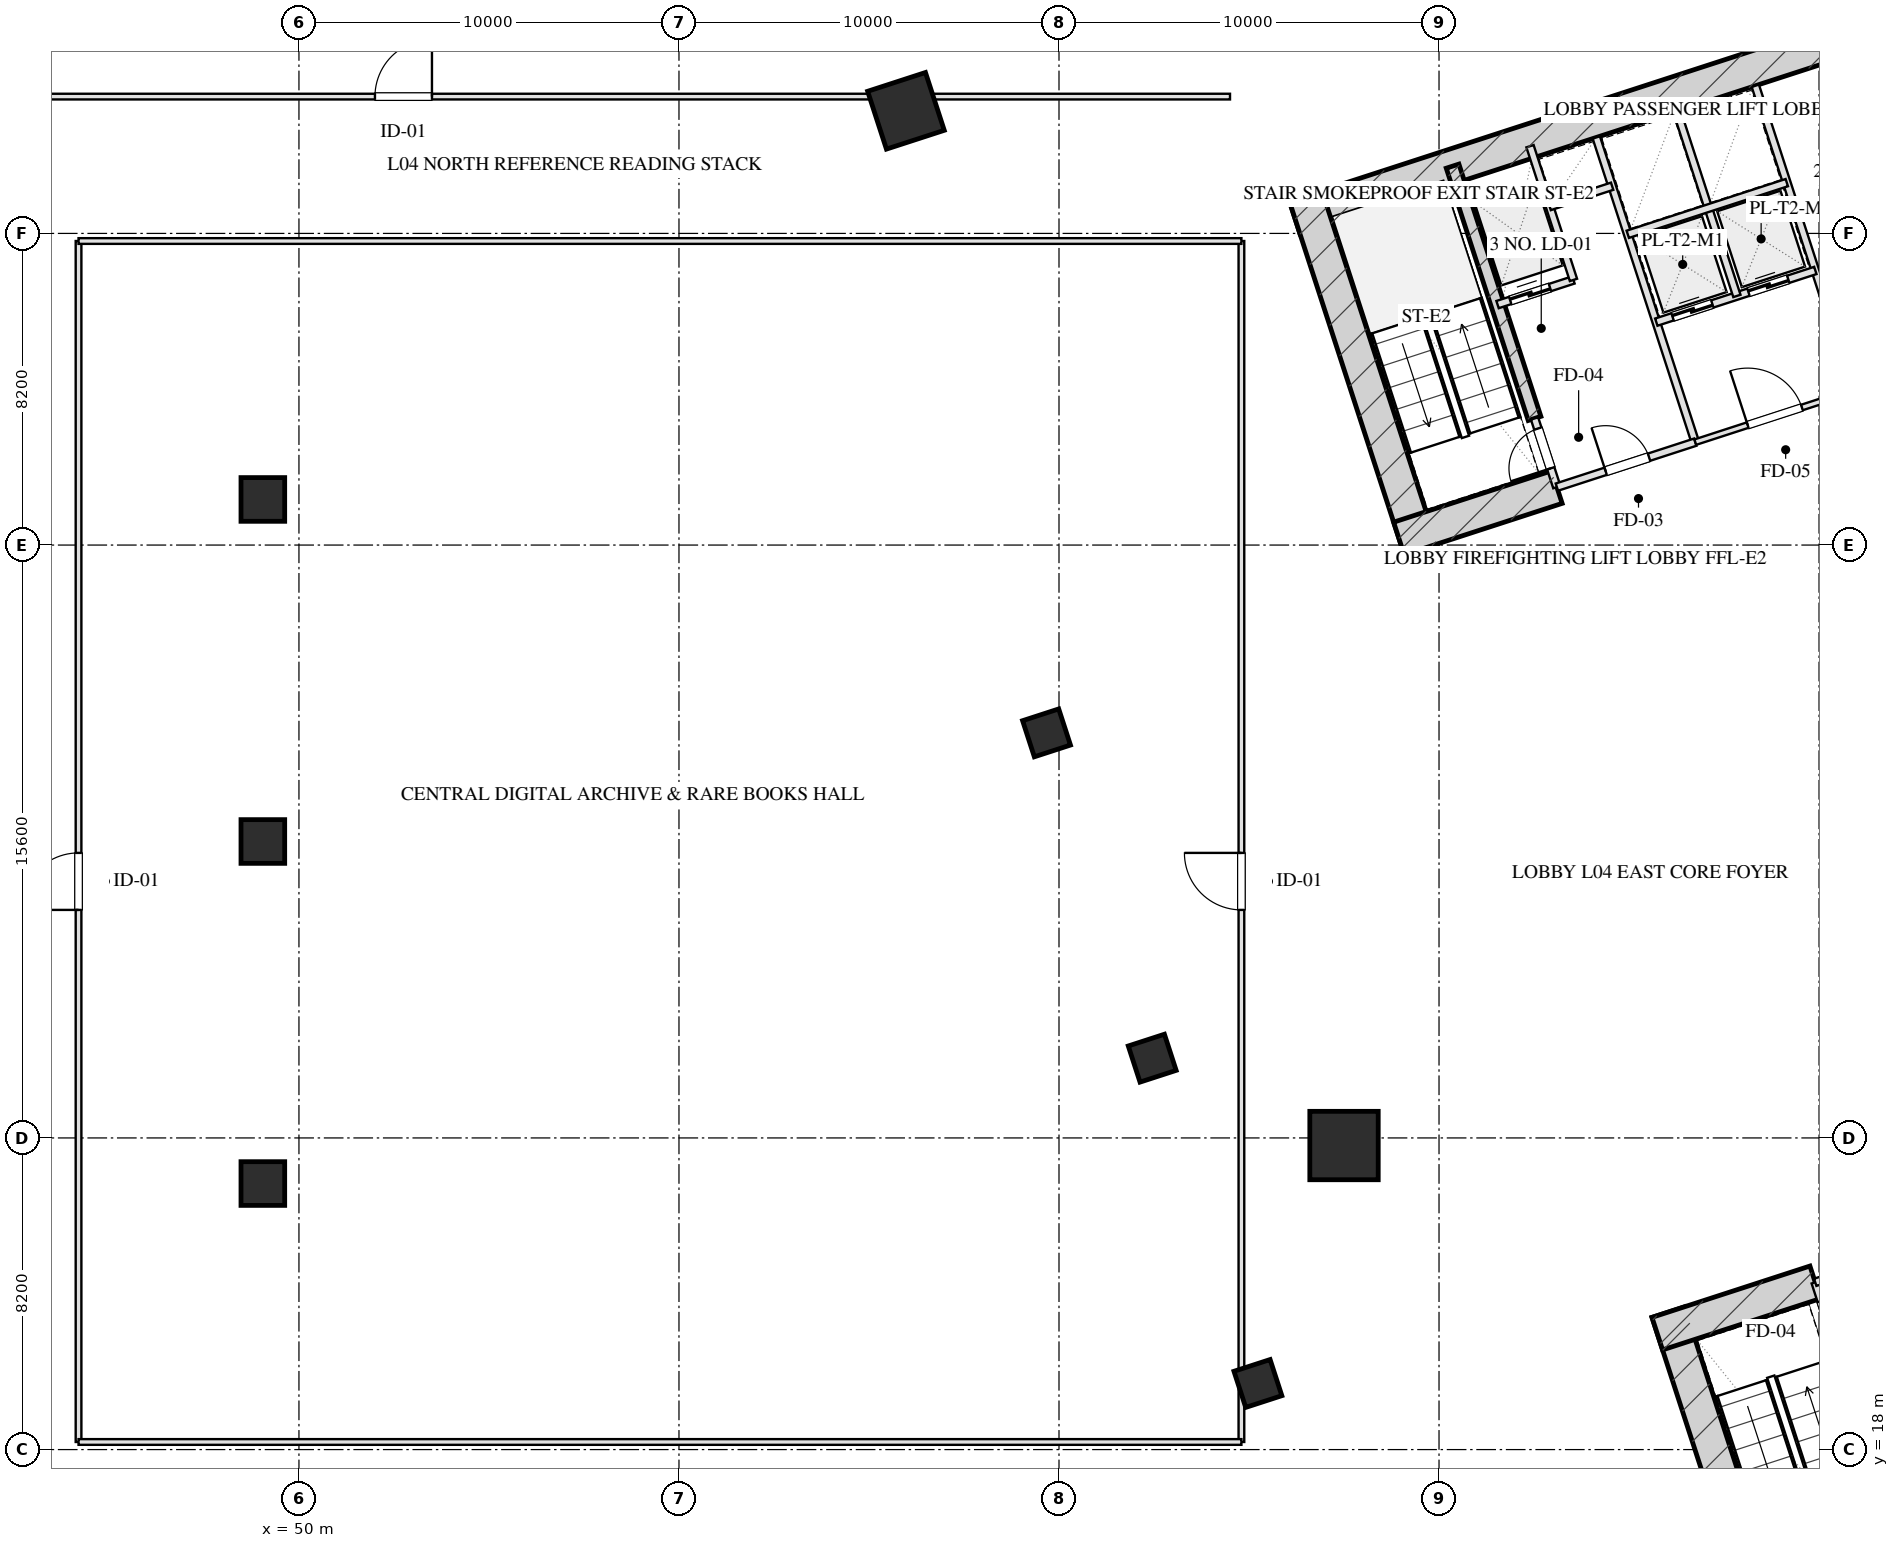
"""IFC4 building model, lengths in metres.
Left out: names, types, materials, properties, quantities, classifications, styles, units other than length and angle.
Written with IfcOpenShell. Run it as: python <this file> out.ifc"""

import sys

from ifc_helpers import new_model, si_unit, direction, frame, frame_2d, origin, origin_2d, place, context, subcontext, project, spatial, rectangle, hollow_rectangle, extrude, element, fill, save


model = new_model("IFC4")
c1 = context("Model", 3, precision=1e-05, world=origin(), true_north=direction((0.0, 1.0)))
c2 = subcontext(c1, "Body", "Model", "MODEL_VIEW")
j1 = project(units=[si_unit("LENGTHUNIT", "METRE"), si_unit("PLANEANGLEUNIT", "RADIAN")], contexts=[c1])
p1 = place(None, origin())
s1 = spatial("IfcSite", under=j1, at=p1, CompositionType="ELEMENT")
p2 = place(p1, origin())
s2 = spatial("IfcBuilding", under=s1, at=p2, CompositionType="ELEMENT")
p3 = place(p2, frame((0.0, 0.0, 22.0)))
s3 = spatial("IfcBuildingStorey", under=s2, at=p3, CompositionType="ELEMENT", Elevation=22.0)
p4 = place(p3, frame((88.487, 12.605, 0.0), z_axis=(0.0, 0.0, 1.0), x_axis=(0.951055016115, 0.309021611416, 0.0)))
e1 = element("IfcWall", 1, at=p4, inside=s3, PredefinedType="SHEAR", context=c2, shape_type="SweptSolid", body=[
    extrude(rectangle(XDim=16.7, YDim=0.9, at=frame_2d((8.35, 0.0))), origin(), (0.0, 0.0, 1.0), 4.0),
])
p5 = place(p3, frame((86.032, 21.618, 0.0), z_axis=(0.0, 0.0, 1.0), x_axis=(0.30901438634, -0.951057363693, 0.0)))
e2 = element("IfcWall", 2, at=p5, inside=s3, PredefinedType="SHEAR", context=c2, shape_type="SweptSolid", body=[
    extrude(rectangle(XDim=9.78, YDim=0.9, at=frame_2d((4.89, 0.0))), origin(), (0.0, 0.0, 1.0), 4.0),
])
p6 = place(p3, frame((85.743, 21.051, 0.0), z_axis=(0.0, 0.0, 1.0), x_axis=(0.951063623806, 0.308995118848, 0.0)))
e3 = element("IfcWall", 3, at=p6, inside=s3, PredefinedType="SHEAR", context=c2, shape_type="SweptSolid", body=[
    extrude(rectangle(XDim=4.37, YDim=0.9, at=frame_2d((2.185, 0.0))), origin(), (0.0, 0.0, 1.0), 4.0),
])
p7 = place(p3, frame((76.201, 50.419, 0.0), z_axis=(0.0, 0.0, 1.0), x_axis=(0.951056412142, 0.309017314926, 0.0)))
e4 = element("IfcWall", 4, at=p7, inside=s3, PredefinedType="SHEAR", context=c2, shape_type="SweptSolid", body=[
    extrude(rectangle(XDim=16.7, YDim=0.9, at=frame_2d((8.35, 0.0))), origin(), (0.0, 0.0, 1.0), 4.0),
])
p8 = place(p3, frame((79.512, 41.685, 0.0), z_axis=(0.0, 0.0, 1.0), x_axis=(-0.309021722829, 0.951054979914, 0.0)))
e5 = element("IfcWall", 5, at=p8, inside=s3, PredefinedType="SHEAR", context=c2, shape_type="SweptSolid", body=[
    extrude(rectangle(XDim=9.78, YDim=0.9, at=frame_2d((4.89, 0.0))), origin(), (0.0, 0.0, 1.0), 4.0),
])
p9 = place(p3, frame((82.514, 45.131, 0.0), z_axis=(0.0, 0.0, 1.0), x_axis=(-0.308988790936, 0.951065679686, 0.0)))
e6 = element("IfcWall", 6, at=p9, inside=s3, PredefinedType="SHEAR", context=c2, shape_type="SweptSolid", body=[
    extrude(rectangle(XDim=6.98, YDim=0.35, at=frame_2d((3.49, 0.0))), origin(), (0.0, 0.0, 1.0), 4.0),
])
p10 = place(p3, frame((78.945, 41.974, 0.0), z_axis=(0.0, 0.0, 1.0), x_axis=(0.951058289404, 0.309011537255, 0.0)))
e7 = element("IfcWall", 7, at=p10, inside=s3, PredefinedType="SHEAR", context=c2, shape_type="SweptSolid", body=[
    extrude(rectangle(XDim=4.37, YDim=0.9, at=frame_2d((2.185, 0.0))), origin(), (0.0, 0.0, 1.0), 4.0),
])
p11 = place(p3, frame((77.5, 26.0, 0.0), z_axis=(0.0, 0.0, 1.0), x_axis=(1.0, 0.0, 0.0)))
e8 = element("IfcColumn", 8, at=p11, inside=s3, PredefinedType="COLUMN", context=c2, shape_type="SweptSolid", body=[
    extrude(hollow_rectangle(XDim=1.8, YDim=1.8, WallThickness=0.06, at=origin_2d()), origin(), (0.0, 0.0, 1.0), 4.001),
])
for number, where, z_axis, x_axis in (
    (9, (49.05, 25.0, 0.0), (0.0, 0.0, 1.0), (1.0, 0.0, 0.0)),
    (10, (49.05, 34.0, 0.0), (0.0, 0.0, 1.0), (1.0, 0.0, 0.0)),
    (11, (49.05, 43.0, 0.0), (0.0, 0.0, 1.0), (1.0, 0.0, 0.0)),
):
    element("IfcColumn", number, at=place(p3, frame(where, z_axis=z_axis, x_axis=x_axis)), inside=s3, PredefinedType="COLUMN", context=c2, shape_type="SweptSolid", body=[
        extrude(hollow_rectangle(XDim=1.15, YDim=1.15, WallThickness=0.04, at=origin_2d()), origin(), (0.0, 0.0, 1.0), 4.001),
    ])
p12 = place(p3, frame((65.973, 53.226, 0.0), z_axis=(0.0, 0.0, 1.0), x_axis=(0.951056516295, 0.309016994375, 0.0)))
e12 = element("IfcColumn", 12, at=p12, inside=s3, PredefinedType="COLUMN", context=c2, shape_type="SweptSolid", body=[
    extrude(hollow_rectangle(XDim=1.6, YDim=1.6, WallThickness=0.055, at=origin_2d()), origin(), (0.0, 0.0, 1.0), 4.001),
])
for number, where, z_axis, x_axis in (
    (13, (75.234, 19.739, 0.0), (0.0, 0.0, 1.0), (0.951, 0.309, 0.0)),
    (14, (72.453, 28.299, 0.0), (0.0, 0.0, 1.0), (0.951, 0.309, 0.0)),
    (15, (69.672, 36.858, 0.0), (0.0, 0.0, 1.0), (0.951, 0.309, 0.0)),
):
    element("IfcColumn", number, at=place(p3, frame(where, z_axis=z_axis, x_axis=x_axis)), inside=s3, PredefinedType="COLUMN", context=c2, shape_type="SweptSolid", body=[
        extrude(hollow_rectangle(XDim=1.0, YDim=1.0, WallThickness=0.036, at=origin_2d()), origin(), (0.0, 0.0, 1.0), 4.001),
    ])
p13 = place(p3, frame((89.899, 22.401, 0.0), z_axis=(0.0, 0.0, 1.0), x_axis=(0.308932062672, -0.951084108086, 0.0)))
e16 = element("IfcWall", 16, at=p13, inside=s3, PredefinedType="PARTITIONING", context=c2, shape_type="SweptSolid", body=[
    extrude(rectangle(XDim=1.9, YDim=0.2, at=frame_2d((0.95, 0.0))), origin(), (0.0, 0.0, 1.0), 3.725),
])
p14 = place(p13, frame((0.52, 0.0, 0.0)))
e17 = element("IfcOpeningElement", 17, at=p14, cuts=e16, PredefinedType="OPENING", context=c2, shape_type="SweptSolid", body=[
    extrude(rectangle(XDim=1.1, YDim=2.05, at=frame_2d((0.55, 1.025))), frame((0.0, 0.11, 0.0), z_axis=(0.0, -1.0, 0.0), x_axis=(1.0, 0.0, 0.0)), (0.0, 0.0, 1.0), 0.22),
])
p15 = place(p3, frame((89.899, 22.401, 0.0), z_axis=(0.0, 0.0, 1.0), x_axis=(0.951046716504, 0.309047153403, 0.0)))
e18 = element("IfcWall", 18, at=p15, inside=s3, PredefinedType="PARTITIONING", context=c2, shape_type="SweptSolid", body=[
    extrude(rectangle(XDim=3.83, YDim=0.2, at=frame_2d((1.915, 0.0))), origin(), (0.0, 0.0, 1.0), 3.725),
])
p16 = place(p15, frame((1.35, 0.0, 0.0)))
e19 = element("IfcOpeningElement", 19, at=p16, cuts=e18, PredefinedType="OPENING", context=c2, shape_type="SweptSolid", body=[
    extrude(rectangle(XDim=1.2, YDim=2.05, at=frame_2d((0.6, 1.025))), frame((0.0, 0.11, 0.0), z_axis=(0.0, -1.0, 0.0), x_axis=(1.0, 0.0, 0.0)), (0.0, 0.0, 1.0), 0.22),
])
p17 = place(p3, frame((83.101, 43.324, 0.0), z_axis=(0.0, 0.0, 1.0), x_axis=(-0.309048298632, 0.951046344356, 0.0)))
e20 = element("IfcWall", 20, at=p17, inside=s3, PredefinedType="PARTITIONING", context=c2, shape_type="SweptSolid", body=[
    extrude(rectangle(XDim=1.9, YDim=0.2, at=frame_2d((0.95, 0.0))), origin(), (0.0, 0.0, 1.0), 3.725),
])
p18 = place(p17, frame((0.52, 0.0, 0.0)))
e21 = element("IfcOpeningElement", 21, at=p18, cuts=e20, PredefinedType="OPENING", context=c2, shape_type="SweptSolid", body=[
    extrude(rectangle(XDim=1.1, YDim=2.05, at=frame_2d((0.55, 1.025))), frame((0.0, 0.11, 0.0), z_axis=(0.0, -1.0, 0.0), x_axis=(1.0, 0.0, 0.0)), (0.0, 0.0, 1.0), 0.22),
])
p19 = place(p3, frame((86.743, 44.508, 0.0), z_axis=(0.0, 0.0, 1.0), x_axis=(-0.309016001439, 0.951056838919, 0.0)))
e22 = element("IfcWall", 22, at=p19, inside=s3, PredefinedType="PARTITIONING", context=c2, shape_type="SweptSolid", body=[
    extrude(rectangle(XDim=8.43, YDim=0.2, at=frame_2d((4.215, 0.0))), origin(), (0.0, 0.0, 1.0), 3.725),
])
p20 = place(p3, frame((83.101, 43.324, 0.0), z_axis=(0.0, 0.0, 1.0), x_axis=(0.951052804469, 0.309028417967, 0.0)))
e23 = element("IfcWall", 23, at=p20, inside=s3, PredefinedType="PARTITIONING", context=c2, shape_type="SweptSolid", body=[
    extrude(rectangle(XDim=3.83, YDim=0.2, at=frame_2d((1.915, 0.0))), origin(), (0.0, 0.0, 1.0), 3.725),
])
p21 = place(p20, frame((1.35, 0.0, 0.0)))
e24 = element("IfcOpeningElement", 24, at=p21, cuts=e23, PredefinedType="OPENING", context=c2, shape_type="SweptSolid", body=[
    extrude(rectangle(XDim=1.2, YDim=2.05, at=frame_2d((0.6, 1.025))), frame((0.0, 0.11, 0.0), z_axis=(0.0, -1.0, 0.0), x_axis=(1.0, 0.0, 0.0)), (0.0, 0.0, 1.0), 0.22),
])
p22 = place(p3, frame((81.54, 48.127, 0.0), z_axis=(0.0, 0.0, 1.0), x_axis=(0.951062257173, 0.308999325213, 0.0)))
e25 = element("IfcWall", 25, at=p22, inside=s3, PredefinedType="PARTITIONING", context=c2, shape_type="SweptSolid", body=[
    extrude(rectangle(XDim=2.1, YDim=0.2, at=frame_2d((1.05, 0.0))), origin(), (0.0, 0.0, 1.0), 3.725),
])
p23 = place(p22, frame((0.35, 0.0, 0.0)))
e26 = element("IfcOpeningElement", 26, at=p23, cuts=e25, PredefinedType="OPENING", context=c2, shape_type="SweptSolid", body=[
    extrude(rectangle(XDim=1.1, YDim=2.05, at=frame_2d((0.55, 1.025))), frame((0.0, 0.11, 0.0), z_axis=(0.0, -1.0, 0.0), x_axis=(1.0, 0.0, 0.0)), (0.0, 0.0, 1.0), 0.22),
])
p24 = place(p3, frame((83.538, 48.776, 0.0), z_axis=(0.0, 0.0, 1.0), x_axis=(-0.3089935693, 0.951064127245, 0.0)))
e27 = element("IfcWall", 27, at=p24, inside=s3, PredefinedType="PARTITIONING", context=c2, shape_type="SweptSolid", body=[
    extrude(rectangle(XDim=3.7, YDim=0.2, at=frame_2d((1.85, 0.0))), origin(), (0.0, 0.0, 1.0), 3.725),
])
p25 = place(p3, frame((82.91, 50.707, 0.0), z_axis=(0.0, 0.0, 1.0), x_axis=(0.951041328149, 0.309063734775, 0.0)))
e28 = element("IfcWall", 28, at=p25, inside=s3, PredefinedType="PARTITIONING", context=c2, shape_type="SweptSolid", body=[
    extrude(rectangle(XDim=1.73, YDim=0.2, at=frame_2d((0.865, 0.0))), origin(), (0.0, 0.0, 1.0), 3.725),
])
p26 = place(p3, frame((90.928, 45.868, 0.0), z_axis=(0.0, 0.0, 1.0), x_axis=(-0.309042196757, 0.951048327176, 0.0)))
e29 = element("IfcWall", 29, at=p26, inside=s3, PredefinedType="PARTITIONING", context=c2, shape_type="SweptSolid", body=[
    extrude(rectangle(XDim=8.43, YDim=0.2, at=frame_2d((4.215, 0.0))), origin(), (0.0, 0.0, 1.0), 3.725),
])
p27 = place(p3, frame((86.743, 44.508, 0.0), z_axis=(0.0, 0.0, 1.0), x_axis=(0.951063829732, 0.308994485023, 0.0)))
e30 = element("IfcWall", 30, at=p27, inside=s3, PredefinedType="PARTITIONING", context=c2, shape_type="SweptSolid", body=[
    extrude(rectangle(XDim=4.4, YDim=0.15, at=frame_2d((2.2, 0.0))), origin(), (0.0, 0.0, 1.0), 3.725),
])
p28 = place(p27, frame((1.45, 0.0, 0.0)))
e31 = element("IfcOpeningElement", 31, at=p28, cuts=e30, PredefinedType="OPENING", context=c2, shape_type="SweptSolid", body=[
    extrude(rectangle(XDim=1.5, YDim=2.05, at=frame_2d((0.75, 1.025))), frame((0.0, 0.085, 0.0), z_axis=(0.0, -1.0, 0.0), x_axis=(1.0, 0.0, 0.0)), (0.0, 0.0, 1.0), 0.17),
])
p29 = place(p3, frame((85.718, 47.666, 0.0), z_axis=(0.0, 0.0, 1.0), x_axis=(0.951058531764, 0.30901079133, 0.0)))
e32 = element("IfcWall", 32, at=p29, inside=s3, PredefinedType="PARTITIONING", context=c2, shape_type="SweptSolid", body=[
    extrude(rectangle(XDim=4.4, YDim=0.2, at=frame_2d((2.2, 0.0))), origin(), (0.0, 0.0, 1.0), 3.725),
])
p30 = place(p29, frame((0.45, 0.0, 0.0)))
e33 = element("IfcOpeningElement", 33, at=p30, cuts=e32, PredefinedType="OPENING", context=c2, shape_type="SweptSolid", body=[
    extrude(rectangle(XDim=1.1, YDim=2.05, at=frame_2d((0.55, 1.025))), frame((0.0, 0.11, 0.0), z_axis=(0.0, -1.0, 0.0), x_axis=(1.0, 0.0, 0.0)), (0.0, 0.0, 1.0), 0.22),
])
p31 = place(p29, frame((2.55, 0.0, 0.0)))
e34 = element("IfcOpeningElement", 34, at=p31, cuts=e32, PredefinedType="OPENING", context=c2, shape_type="SweptSolid", body=[
    extrude(rectangle(XDim=1.1, YDim=2.05, at=frame_2d((0.55, 1.025))), frame((0.0, 0.11, 0.0), z_axis=(0.0, -1.0, 0.0), x_axis=(1.0, 0.0, 0.0)), (0.0, 0.0, 1.0), 0.22),
])
p32 = place(p3, frame((87.838, 48.354, 0.0), z_axis=(0.0, 0.0, 1.0), x_axis=(-0.3090093719, 0.951058992953, 0.0)))
e35 = element("IfcWall", 35, at=p32, inside=s3, PredefinedType="PARTITIONING", context=c2, shape_type="SweptSolid", body=[
    extrude(rectangle(XDim=5.11, YDim=0.2, at=frame_2d((2.555, 0.0))), origin(), (0.0, 0.0, 1.0), 3.725),
])
p33 = place(p3, frame((84.967, 49.977, 0.0), z_axis=(0.0, 0.0, 1.0), x_axis=(0.951063829732, 0.308994485023, 0.0)))
e36 = element("IfcWall", 36, at=p33, inside=s3, PredefinedType="PARTITIONING", context=c2, shape_type="SweptSolid", body=[
    extrude(rectangle(XDim=4.4, YDim=0.2, at=frame_2d((2.2, 0.0))), origin(), (0.0, 0.0, 1.0), 3.725),
])
p34 = place(p3, frame((44.2, 18.2, 0.0), z_axis=(0.0, 0.0, 1.0), x_axis=(0.0, 1.0, 0.0)))
e37 = element("IfcWall", 37, at=p34, inside=s3, PredefinedType="PARTITIONING", context=c2, shape_type="SweptSolid", body=[
    extrude(rectangle(XDim=31.6, YDim=0.15, at=frame_2d((15.8, 0.0))), origin(), (0.0, 0.0, 1.0), 3.725),
])
p35 = place(p34, frame((14.0, 0.0, 0.0)))
e38 = element("IfcOpeningElement", 38, at=p35, cuts=e37, PredefinedType="OPENING", context=c2, shape_type="SweptSolid", body=[
    extrude(rectangle(XDim=1.5, YDim=2.05, at=frame_2d((0.75, 1.025))), frame((0.0, 0.085, 0.0), z_axis=(0.0, -1.0, 0.0), x_axis=(1.0, 0.0, 0.0)), (0.0, 0.0, 1.0), 0.17),
])
p36 = place(p3, frame((74.8, 18.2, 0.0), z_axis=(0.0, 0.0, 1.0), x_axis=(0.0, 1.0, 0.0)))
e39 = element("IfcWall", 39, at=p36, inside=s3, PredefinedType="PARTITIONING", context=c2, shape_type="SweptSolid", body=[
    extrude(rectangle(XDim=31.6, YDim=0.15, at=frame_2d((15.8, 0.0))), origin(), (0.0, 0.0, 1.0), 2.315),
])
p37 = place(p36, frame((14.0, 0.0, 0.0)))
e40 = element("IfcOpeningElement", 40, at=p37, cuts=e39, PredefinedType="OPENING", context=c2, shape_type="SweptSolid", body=[
    extrude(rectangle(XDim=1.5, YDim=2.05, at=frame_2d((0.75, 1.025))), frame((0.0, 0.085, 0.0), z_axis=(0.0, -1.0, 0.0), x_axis=(1.0, 0.0, 0.0)), (0.0, 0.0, 1.0), 0.17),
])
for number, where, z_axis, x_axis in (
    (41, (44.2, 18.2, 0.0), (0.0, 0.0, 1.0), (1.0, 0.0, 0.0)),
    (42, (44.2, 49.8, 0.0), (0.0, 0.0, 1.0), (1.0, 0.0, 0.0)),
):
    element("IfcWall", number, at=place(p3, frame(where, z_axis=z_axis, x_axis=x_axis)), inside=s3, PredefinedType="PARTITIONING", context=c2, shape_type="SweptSolid", body=[
        extrude(rectangle(XDim=30.6, YDim=0.15, at=frame_2d((15.3, 0.0))), origin(), (0.0, 0.0, 1.0), 3.265),
    ])
p38 = place(p3, frame((40.0, 53.6, 0.0), z_axis=(0.0, 0.0, 1.0), x_axis=(1.0, 0.0, 0.0)))
e43 = element("IfcWall", 43, at=p38, inside=s3, PredefinedType="PARTITIONING", context=c2, shape_type="SweptSolid", body=[
    extrude(rectangle(XDim=34.5, YDim=0.15, at=frame_2d((17.25, 0.0))), origin(), (0.0, 0.0, 1.0), 2.315),
])
p39 = place(p38, frame((12.0, 0.0, 0.0)))
e44 = element("IfcOpeningElement", 44, at=p39, cuts=e43, PredefinedType="OPENING", context=c2, shape_type="SweptSolid", body=[
    extrude(rectangle(XDim=1.5, YDim=2.05, at=frame_2d((0.75, 1.025))), frame((0.0, 0.085, 0.0), z_axis=(0.0, -1.0, 0.0), x_axis=(1.0, 0.0, 0.0)), (0.0, 0.0, 1.0), 0.17),
])
p40 = place(p18, origin())
e45 = element("IfcDoor", 45, at=p40, inside=s3, OperationType="SINGLE_SWING_LEFT", PredefinedType="DOOR", context=c2, shape_type="SweptSolid", body=[
    extrude(rectangle(XDim=1.1, YDim=2.05, at=frame_2d((0.55, 1.025))), frame((0.0, 0.025, 0.0), z_axis=(0.0, -1.0, 0.0), x_axis=(1.0, 0.0, 0.0)), (0.0, 0.0, 1.0), 0.05),
])
fill(e21, e45)
p41 = place(p21, origin())
e46 = element("IfcDoor", 46, at=p41, inside=s3, OperationType="SINGLE_SWING_LEFT", PredefinedType="DOOR", context=c2, shape_type="SweptSolid", body=[
    extrude(rectangle(XDim=1.2, YDim=2.05, at=frame_2d((0.6, 1.025))), frame((0.0, 0.025, 0.0), z_axis=(0.0, -1.0, 0.0), x_axis=(1.0, 0.0, 0.0)), (0.0, 0.0, 1.0), 0.05),
])
fill(e24, e46)
p42 = place(p23, origin())
e47 = element("IfcDoor", 47, at=p42, inside=s3, OperationType="DOUBLE_DOOR_SLIDING", PredefinedType="DOOR", context=c2, shape_type="SweptSolid", body=[
    extrude(rectangle(XDim=1.1, YDim=2.05, at=frame_2d((0.55, 1.025))), frame((0.0, 0.025, 0.0), z_axis=(0.0, -1.0, 0.0), x_axis=(1.0, 0.0, 0.0)), (0.0, 0.0, 1.0), 0.05),
])
fill(e26, e47)
p43 = place(p28, origin())
e48 = element("IfcDoor", 48, at=p43, inside=s3, OperationType="SINGLE_SWING_LEFT", PredefinedType="DOOR", context=c2, shape_type="SweptSolid", body=[
    extrude(rectangle(XDim=1.5, YDim=2.05, at=frame_2d((0.75, 1.025))), frame((0.0, 0.025, 0.0), z_axis=(0.0, -1.0, 0.0), x_axis=(1.0, 0.0, 0.0)), (0.0, 0.0, 1.0), 0.05),
])
fill(e31, e48)
p44 = place(p30, origin())
e49 = element("IfcDoor", 49, at=p44, inside=s3, OperationType="DOUBLE_DOOR_SLIDING", PredefinedType="DOOR", context=c2, shape_type="SweptSolid", body=[
    extrude(rectangle(XDim=1.1, YDim=2.05, at=frame_2d((0.55, 1.025))), frame((0.0, 0.025, 0.0), z_axis=(0.0, -1.0, 0.0), x_axis=(1.0, 0.0, 0.0)), (0.0, 0.0, 1.0), 0.05),
])
fill(e33, e49)
p45 = place(p31, origin())
e50 = element("IfcDoor", 50, at=p45, inside=s3, OperationType="DOUBLE_DOOR_SLIDING", PredefinedType="DOOR", context=c2, shape_type="SweptSolid", body=[
    extrude(rectangle(XDim=1.1, YDim=2.05, at=frame_2d((0.55, 1.025))), frame((0.0, 0.025, 0.0), z_axis=(0.0, -1.0, 0.0), x_axis=(1.0, 0.0, 0.0)), (0.0, 0.0, 1.0), 0.05),
])
fill(e34, e50)
p46 = place(p35, origin())
e51 = element("IfcDoor", 51, at=p46, inside=s3, OperationType="SINGLE_SWING_LEFT", PredefinedType="DOOR", context=c2, shape_type="SweptSolid", body=[
    extrude(rectangle(XDim=1.5, YDim=2.05, at=frame_2d((0.75, 1.025))), frame((0.0, 0.025, 0.0), z_axis=(0.0, -1.0, 0.0), x_axis=(1.0, 0.0, 0.0)), (0.0, 0.0, 1.0), 0.05),
])
fill(e38, e51)
p47 = place(p37, origin())
e52 = element("IfcDoor", 52, at=p47, inside=s3, OperationType="SINGLE_SWING_RIGHT", PredefinedType="DOOR", context=c2, shape_type="SweptSolid", body=[
    extrude(rectangle(XDim=1.5, YDim=2.05, at=frame_2d((0.75, 1.025))), frame((0.0, 0.025, 0.0), z_axis=(0.0, -1.0, 0.0), x_axis=(1.0, 0.0, 0.0)), (0.0, 0.0, 1.0), 0.05),
])
fill(e40, e52)
p48 = place(p39, origin())
e53 = element("IfcDoor", 53, at=p48, inside=s3, OperationType="SINGLE_SWING_RIGHT", PredefinedType="DOOR", context=c2, shape_type="SweptSolid", body=[
    extrude(rectangle(XDim=1.5, YDim=2.05, at=frame_2d((0.75, 1.025))), frame((0.0, 0.025, 0.0), z_axis=(0.0, -1.0, 0.0), x_axis=(1.0, 0.0, 0.0)), (0.0, 0.0, 1.0), 0.05),
])
fill(e44, e53)
save(model, sys.argv[1])
